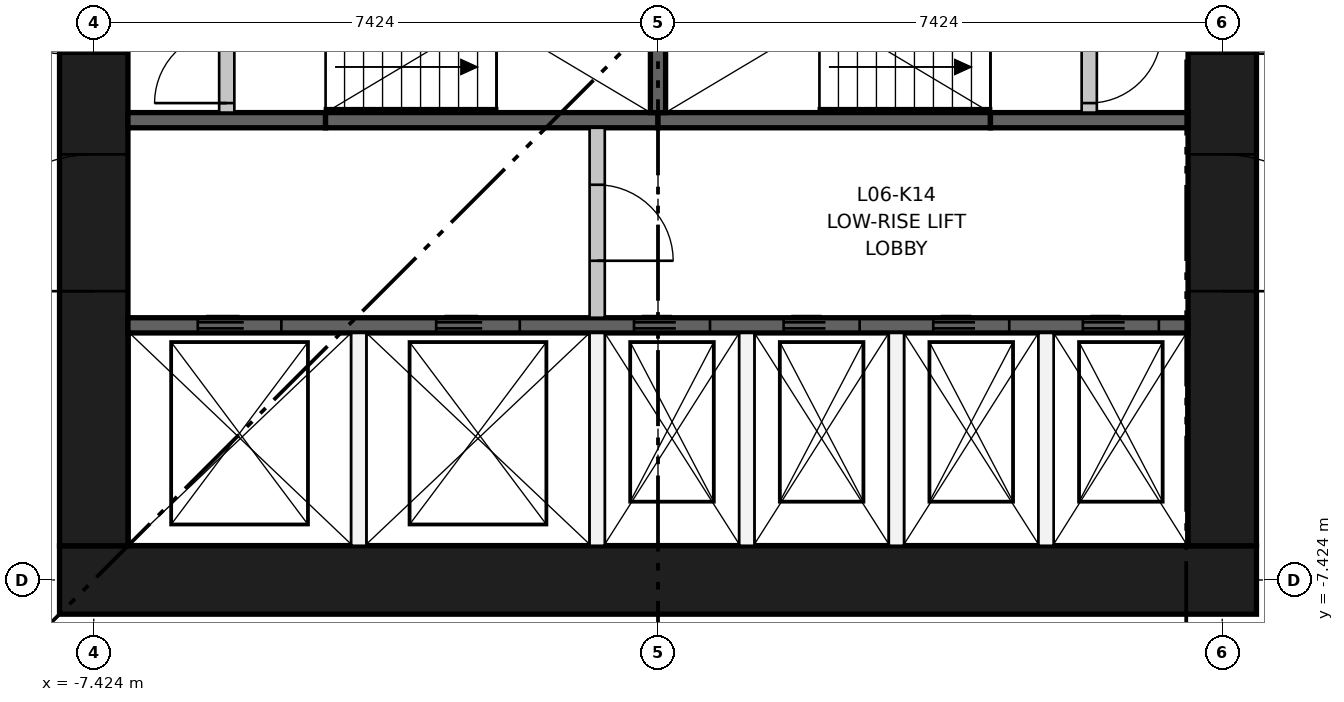
"""IFC4 building model, lengths in metres.
Left out: names, types, materials, properties, quantities, classifications, styles, units other than length and angle.
Written with IfcOpenShell. Run it as: python <this file> out.ifc"""

import sys

from ifc_helpers import new_model, si_unit, direction, frame, frame_2d, origin, place, context, subcontext, project, spatial, rectangle, extrude, element, fill, save


model = new_model("IFC4")
c1 = context("Model", 3, precision=1e-05, world=origin(), true_north=direction((0.0, 1.0)))
c2 = subcontext(c1, "Body", "Model", "MODEL_VIEW")
j1 = project(units=[si_unit("LENGTHUNIT", "METRE"), si_unit("PLANEANGLEUNIT", "RADIAN")], contexts=[c1])
p1 = place(None, origin())
s1 = spatial("IfcSite", under=j1, at=p1, CompositionType="ELEMENT")
p2 = place(p1, origin())
s2 = spatial("IfcBuilding", under=s1, at=p2, CompositionType="ELEMENT")
p3 = place(p2, frame((0.0, 0.0, 26.2)))
s3 = spatial("IfcBuildingStorey", under=s2, at=p3, CompositionType="ELEMENT", Elevation=26.2)
p4 = place(p3, frame((-7.874, -7.424, 0.0), z_axis=(0.0, 0.0, 1.0), x_axis=(1.0, 0.0, 0.0)))
e1 = element("IfcWall", 1, at=p4, inside=s3, PredefinedType="SHEAR", context=c2, shape_type="SweptSolid", body=[
    extrude(rectangle(XDim=15.748, YDim=0.9, at=frame_2d((7.874, 0.0))), origin(), (0.0, 0.0, 1.0), 3.65),
])
p5 = place(p3, frame((-7.424, -6.974, 0.0), z_axis=(0.0, 0.0, 1.0), x_axis=(0.0, 1.0, 0.0)))
e2 = element("IfcWall", 2, at=p5, inside=s3, PredefinedType="SHEAR", context=c2, shape_type="SweptSolid", body=[
    extrude(rectangle(XDim=13.948, YDim=0.9, at=frame_2d((6.974, 0.0))), origin(), (0.0, 0.0, 1.0), 3.65),
])
p6 = place(p5, frame((6.474, 0.0, 0.0)))
e3 = element("IfcOpeningElement", 3, at=p6, cuts=e2, PredefinedType="OPENING", context=c2, shape_type="SweptSolid", body=[
    extrude(rectangle(XDim=1.0, YDim=2.1, at=frame_2d((0.5, 1.05))), frame((0.0, 0.46, 0.0), z_axis=(0.0, -1.0, 0.0), x_axis=(1.0, 0.0, 0.0)), (0.0, 0.0, 1.0), 0.92),
])
p7 = place(p5, frame((3.35, 0.0, 0.0)))
e4 = element("IfcOpeningElement", 4, at=p7, cuts=e2, PredefinedType="OPENING", context=c2, shape_type="SweptSolid", body=[
    extrude(rectangle(XDim=1.8, YDim=2.1, at=frame_2d((0.9, 1.05))), frame((0.0, 0.46, 0.0), z_axis=(0.0, -1.0, 0.0), x_axis=(1.0, 0.0, 0.0)), (0.0, 0.0, 1.0), 0.92),
])
p8 = place(p5, frame((8.799, 0.0, 0.0)))
e5 = element("IfcOpeningElement", 5, at=p8, cuts=e2, PredefinedType="OPENING", context=c2, shape_type="SweptSolid", body=[
    extrude(rectangle(XDim=1.8, YDim=2.1, at=frame_2d((0.9, 1.05))), frame((0.0, 0.46, 0.0), z_axis=(0.0, -1.0, 0.0), x_axis=(1.0, 0.0, 0.0)), (0.0, 0.0, 1.0), 0.92),
])
p9 = place(p5, frame((11.974, 0.0, 0.0)))
e6 = element("IfcOpeningElement", 6, at=p9, cuts=e2, PredefinedType="OPENING", context=c2, shape_type="SweptSolid", body=[
    extrude(rectangle(XDim=1.0, YDim=2.1, at=frame_2d((0.5, 1.05))), frame((0.0, 0.46, 0.0), z_axis=(0.0, -1.0, 0.0), x_axis=(1.0, 0.0, 0.0)), (0.0, 0.0, 1.0), 0.92),
])
p10 = place(p3, frame((7.424, -6.974, 0.0), z_axis=(0.0, 0.0, 1.0), x_axis=(0.0, 1.0, 0.0)))
e7 = element("IfcWall", 7, at=p10, inside=s3, PredefinedType="SHEAR", context=c2, shape_type="SweptSolid", body=[
    extrude(rectangle(XDim=13.948, YDim=0.9, at=frame_2d((6.974, 0.0))), origin(), (0.0, 0.0, 1.0), 3.65),
])
p11 = place(p10, frame((6.474, 0.0, 0.0)))
e8 = element("IfcOpeningElement", 8, at=p11, cuts=e7, PredefinedType="OPENING", context=c2, shape_type="SweptSolid", body=[
    extrude(rectangle(XDim=1.0, YDim=2.1, at=frame_2d((0.5, 1.05))), frame((0.0, 0.46, 0.0), z_axis=(0.0, -1.0, 0.0), x_axis=(1.0, 0.0, 0.0)), (0.0, 0.0, 1.0), 0.92),
])
p12 = place(p10, frame((3.35, 0.0, 0.0)))
e9 = element("IfcOpeningElement", 9, at=p12, cuts=e7, PredefinedType="OPENING", context=c2, shape_type="SweptSolid", body=[
    extrude(rectangle(XDim=1.8, YDim=2.1, at=frame_2d((0.9, 1.05))), frame((0.0, 0.46, 0.0), z_axis=(0.0, -1.0, 0.0), x_axis=(1.0, 0.0, 0.0)), (0.0, 0.0, 1.0), 0.92),
])
p13 = place(p10, frame((8.799, 0.0, 0.0)))
e10 = element("IfcOpeningElement", 10, at=p13, cuts=e7, PredefinedType="OPENING", context=c2, shape_type="SweptSolid", body=[
    extrude(rectangle(XDim=1.8, YDim=2.1, at=frame_2d((0.9, 1.05))), frame((0.0, 0.46, 0.0), z_axis=(0.0, -1.0, 0.0), x_axis=(1.0, 0.0, 0.0)), (0.0, 0.0, 1.0), 0.92),
])
p14 = place(p3, frame((-6.974, -4.074, 0.0), z_axis=(0.0, 0.0, 1.0), x_axis=(1.0, 0.0, 0.0)))
e11 = element("IfcWall", 11, at=p14, inside=s3, PredefinedType="SHEAR", context=c2, shape_type="SweptSolid", body=[
    extrude(rectangle(XDim=13.948, YDim=0.2, at=frame_2d((6.974, 0.0))), origin(), (0.0, 0.0, 1.0), 3.3),
])
p15 = place(p14, frame((0.918, 0.0, 0.0)))
e12 = element("IfcOpeningElement", 12, at=p15, cuts=e11, PredefinedType="OPENING", context=c2, shape_type="SweptSolid", body=[
    extrude(rectangle(XDim=1.1, YDim=2.1, at=frame_2d((0.55, 1.05))), frame((0.0, 0.11, 0.0), z_axis=(0.0, -1.0, 0.0), x_axis=(1.0, 0.0, 0.0)), (0.0, 0.0, 1.0), 0.22),
])
p16 = place(p14, frame((4.055, 0.0, 0.0)))
e13 = element("IfcOpeningElement", 13, at=p16, cuts=e11, PredefinedType="OPENING", context=c2, shape_type="SweptSolid", body=[
    extrude(rectangle(XDim=1.1, YDim=2.1, at=frame_2d((0.55, 1.05))), frame((0.0, 0.11, 0.0), z_axis=(0.0, -1.0, 0.0), x_axis=(1.0, 0.0, 0.0)), (0.0, 0.0, 1.0), 0.22),
])
p17 = place(p14, frame((6.658, 0.0, 0.0)))
e14 = element("IfcOpeningElement", 14, at=p17, cuts=e11, PredefinedType="OPENING", context=c2, shape_type="SweptSolid", body=[
    extrude(rectangle(XDim=1.0, YDim=2.1, at=frame_2d((0.5, 1.05))), frame((0.0, 0.11, 0.0), z_axis=(0.0, -1.0, 0.0), x_axis=(1.0, 0.0, 0.0)), (0.0, 0.0, 1.0), 0.22),
])
p18 = place(p14, frame((8.627, 0.0, 0.0)))
e15 = element("IfcOpeningElement", 15, at=p18, cuts=e11, PredefinedType="OPENING", context=c2, shape_type="SweptSolid", body=[
    extrude(rectangle(XDim=1.0, YDim=2.1, at=frame_2d((0.5, 1.05))), frame((0.0, 0.11, 0.0), z_axis=(0.0, -1.0, 0.0), x_axis=(1.0, 0.0, 0.0)), (0.0, 0.0, 1.0), 0.22),
])
p19 = place(p14, frame((10.595, 0.0, 0.0)))
e16 = element("IfcOpeningElement", 16, at=p19, cuts=e11, PredefinedType="OPENING", context=c2, shape_type="SweptSolid", body=[
    extrude(rectangle(XDim=1.0, YDim=2.1, at=frame_2d((0.5, 1.05))), frame((0.0, 0.11, 0.0), z_axis=(0.0, -1.0, 0.0), x_axis=(1.0, 0.0, 0.0)), (0.0, 0.0, 1.0), 0.22),
])
p20 = place(p14, frame((12.564, 0.0, 0.0)))
e17 = element("IfcOpeningElement", 17, at=p20, cuts=e11, PredefinedType="OPENING", context=c2, shape_type="SweptSolid", body=[
    extrude(rectangle(XDim=1.0, YDim=2.1, at=frame_2d((0.5, 1.05))), frame((0.0, 0.11, 0.0), z_axis=(0.0, -1.0, 0.0), x_axis=(1.0, 0.0, 0.0)), (0.0, 0.0, 1.0), 0.22),
])
p21 = place(p3, frame((-6.974, -1.375, 0.0), z_axis=(0.0, 0.0, 1.0), x_axis=(1.0, 0.0, 0.0)))
e18 = element("IfcWall", 18, at=p21, inside=s3, PredefinedType="SHEAR", context=c2, shape_type="SweptSolid", body=[
    extrude(rectangle(XDim=2.6, YDim=0.2, at=frame_2d((1.3, 0.0))), origin(), (0.0, 0.0, 1.0), 3.3),
])
for number, where, z_axis, x_axis in (
    (19, (-4.374, -1.375, 0.0), (0.0, 0.0, 1.0), (1.0, 0.0, 0.0)),
    (20, (0.0, -1.375, 0.0), (0.0, 0.0, 1.0), (1.0, 0.0, 0.0)),
):
    element("IfcWall", number, at=place(p3, frame(where, z_axis=z_axis, x_axis=x_axis)), inside=s3, PredefinedType="SHEAR", context=c2, shape_type="SweptSolid", body=[
        extrude(rectangle(XDim=4.374, YDim=0.2, at=frame_2d((2.187, 0.0))), origin(), (0.0, 0.0, 1.0), 3.3),
    ])
p22 = place(p3, frame((4.374, -1.375, 0.0), z_axis=(0.0, 0.0, 1.0), x_axis=(1.0, 0.0, 0.0)))
e21 = element("IfcWall", 21, at=p22, inside=s3, PredefinedType="SHEAR", context=c2, shape_type="SweptSolid", body=[
    extrude(rectangle(XDim=2.6, YDim=0.2, at=frame_2d((1.3, 0.0))), origin(), (0.0, 0.0, 1.0), 3.3),
])
p23 = place(p3, frame((0.0, -1.275, 0.0), z_axis=(0.0, 0.0, 1.0), x_axis=(0.0, 1.0, 0.0)))
e22 = element("IfcWall", 22, at=p23, inside=s3, PredefinedType="SHEAR", context=c2, shape_type="SweptSolid", body=[
    extrude(rectangle(XDim=2.55, YDim=0.2, at=frame_2d((1.275, 0.0))), origin(), (0.0, 0.0, 1.0), 3.3),
])
for number, where, z_axis, x_axis in (
    (23, (-3.937, -6.974, 0.0), (0.0, 0.0, 1.0), (0.0, 1.0, 0.0)),
    (24, (-0.8, -6.974, 0.0), (0.0, 0.0, 1.0), (0.0, 1.0, 0.0)),
):
    element("IfcWall", number, at=place(p3, frame(where, z_axis=z_axis, x_axis=x_axis)), inside=s3, PredefinedType="PARTITIONING", context=c2, shape_type="SweptSolid", body=[
        extrude(rectangle(XDim=2.8, YDim=0.2, at=frame_2d((1.4, 0.0))), origin(), (0.0, 0.0, 1.0), 3.3),
    ])
p24 = place(p3, frame((-0.8, -3.974, 0.0), z_axis=(0.0, 0.0, 1.0), x_axis=(0.0, 1.0, 0.0)))
e25 = element("IfcWall", 25, at=p24, inside=s3, PredefinedType="PARTITIONING", context=c2, shape_type="SweptSolid", body=[
    extrude(rectangle(XDim=2.499, YDim=0.2, at=frame_2d((1.25, 0.0))), origin(), (0.0, 0.0, 1.0), 3.3),
])
p25 = place(p24, frame((0.75, 0.0, 0.0)))
e26 = element("IfcOpeningElement", 26, at=p25, cuts=e25, PredefinedType="OPENING", context=c2, shape_type="SweptSolid", body=[
    extrude(rectangle(XDim=1.0, YDim=2.1, at=frame_2d((0.5, 1.05))), frame((0.0, 0.11, 0.0), z_axis=(0.0, -1.0, 0.0), x_axis=(1.0, 0.0, 0.0)), (0.0, 0.0, 1.0), 0.22),
])
for number, where, z_axis, x_axis in (
    (27, (1.168, -6.974, 0.0), (0.0, 0.0, 1.0), (0.0, 1.0, 0.0)),
    (28, (3.137, -6.974, 0.0), (0.0, 0.0, 1.0), (0.0, 1.0, 0.0)),
    (29, (5.105, -6.974, 0.0), (0.0, 0.0, 1.0), (0.0, 1.0, 0.0)),
):
    element("IfcWall", number, at=place(p3, frame(where, z_axis=z_axis, x_axis=x_axis)), inside=s3, PredefinedType="PARTITIONING", context=c2, shape_type="SweptSolid", body=[
        extrude(rectangle(XDim=2.8, YDim=0.2, at=frame_2d((1.4, 0.0))), origin(), (0.0, 0.0, 1.0), 3.3),
    ])
p26 = place(p3, frame((-5.674, -1.275, 0.0), z_axis=(0.0, 0.0, 1.0), x_axis=(0.0, 1.0, 0.0)))
e30 = element("IfcWall", 30, at=p26, inside=s3, PredefinedType="PARTITIONING", context=c2, shape_type="SweptSolid", body=[
    extrude(rectangle(XDim=2.55, YDim=0.2, at=frame_2d((1.275, 0.0))), origin(), (0.0, 0.0, 1.0), 3.3),
])
p27 = place(p26, frame((0.125, 0.0, 0.0)))
e31 = element("IfcOpeningElement", 31, at=p27, cuts=e30, PredefinedType="OPENING", context=c2, shape_type="SweptSolid", body=[
    extrude(rectangle(XDim=0.95, YDim=2.1, at=frame_2d((0.475, 1.05))), frame((0.0, 0.11, 0.0), z_axis=(0.0, -1.0, 0.0), x_axis=(1.0, 0.0, 0.0)), (0.0, 0.0, 1.0), 0.22),
])
p28 = place(p26, frame((1.475, 0.0, 0.0)))
e32 = element("IfcOpeningElement", 32, at=p28, cuts=e30, PredefinedType="OPENING", context=c2, shape_type="SweptSolid", body=[
    extrude(rectangle(XDim=0.95, YDim=2.1, at=frame_2d((0.475, 1.05))), frame((0.0, 0.11, 0.0), z_axis=(0.0, -1.0, 0.0), x_axis=(1.0, 0.0, 0.0)), (0.0, 0.0, 1.0), 0.22),
])
p29 = place(p3, frame((5.674, -1.275, 0.0), z_axis=(0.0, 0.0, 1.0), x_axis=(0.0, 1.0, 0.0)))
e33 = element("IfcWall", 33, at=p29, inside=s3, PredefinedType="PARTITIONING", context=c2, shape_type="SweptSolid", body=[
    extrude(rectangle(XDim=2.55, YDim=0.2, at=frame_2d((1.275, 0.0))), origin(), (0.0, 0.0, 1.0), 3.3),
])
p30 = place(p29, frame((0.125, 0.0, 0.0)))
e34 = element("IfcOpeningElement", 34, at=p30, cuts=e33, PredefinedType="OPENING", context=c2, shape_type="SweptSolid", body=[
    extrude(rectangle(XDim=0.95, YDim=2.1, at=frame_2d((0.475, 1.05))), frame((0.0, 0.11, 0.0), z_axis=(0.0, -1.0, 0.0), x_axis=(1.0, 0.0, 0.0)), (0.0, 0.0, 1.0), 0.22),
])
p31 = place(p29, frame((1.475, 0.0, 0.0)))
e35 = element("IfcOpeningElement", 35, at=p31, cuts=e33, PredefinedType="OPENING", context=c2, shape_type="SweptSolid", body=[
    extrude(rectangle(XDim=0.95, YDim=2.1, at=frame_2d((0.475, 1.05))), frame((0.0, 0.11, 0.0), z_axis=(0.0, -1.0, 0.0), x_axis=(1.0, 0.0, 0.0)), (0.0, 0.0, 1.0), 0.22),
])
p32 = place(p15, origin())
e36 = element("IfcDoor", 36, at=p32, inside=s3, OperationType="DOUBLE_DOOR_SLIDING", PredefinedType="DOOR", context=c2, shape_type="SweptSolid", body=[
    extrude(rectangle(XDim=1.1, YDim=2.1, at=frame_2d((0.55, 1.05))), frame((0.0, 0.025, 0.0), z_axis=(0.0, -1.0, 0.0), x_axis=(1.0, 0.0, 0.0)), (0.0, 0.0, 1.0), 0.05),
])
fill(e12, e36)
p33 = place(p16, origin())
e37 = element("IfcDoor", 37, at=p33, inside=s3, OperationType="DOUBLE_DOOR_SLIDING", PredefinedType="DOOR", context=c2, shape_type="SweptSolid", body=[
    extrude(rectangle(XDim=1.1, YDim=2.1, at=frame_2d((0.55, 1.05))), frame((0.0, 0.025, 0.0), z_axis=(0.0, -1.0, 0.0), x_axis=(1.0, 0.0, 0.0)), (0.0, 0.0, 1.0), 0.05),
])
fill(e13, e37)
p34 = place(p17, origin())
e38 = element("IfcDoor", 38, at=p34, inside=s3, OperationType="DOUBLE_DOOR_SLIDING", PredefinedType="DOOR", context=c2, shape_type="SweptSolid", body=[
    extrude(rectangle(XDim=1.0, YDim=2.1, at=frame_2d((0.5, 1.05))), frame((0.0, 0.025, 0.0), z_axis=(0.0, -1.0, 0.0), x_axis=(1.0, 0.0, 0.0)), (0.0, 0.0, 1.0), 0.05),
])
fill(e14, e38)
p35 = place(p18, origin())
e39 = element("IfcDoor", 39, at=p35, inside=s3, OperationType="DOUBLE_DOOR_SLIDING", PredefinedType="DOOR", context=c2, shape_type="SweptSolid", body=[
    extrude(rectangle(XDim=1.0, YDim=2.1, at=frame_2d((0.5, 1.05))), frame((0.0, 0.025, 0.0), z_axis=(0.0, -1.0, 0.0), x_axis=(1.0, 0.0, 0.0)), (0.0, 0.0, 1.0), 0.05),
])
fill(e15, e39)
p36 = place(p19, origin())
e40 = element("IfcDoor", 40, at=p36, inside=s3, OperationType="DOUBLE_DOOR_SLIDING", PredefinedType="DOOR", context=c2, shape_type="SweptSolid", body=[
    extrude(rectangle(XDim=1.0, YDim=2.1, at=frame_2d((0.5, 1.05))), frame((0.0, 0.025, 0.0), z_axis=(0.0, -1.0, 0.0), x_axis=(1.0, 0.0, 0.0)), (0.0, 0.0, 1.0), 0.05),
])
fill(e16, e40)
p37 = place(p20, origin())
e41 = element("IfcDoor", 41, at=p37, inside=s3, OperationType="DOUBLE_DOOR_SLIDING", PredefinedType="DOOR", context=c2, shape_type="SweptSolid", body=[
    extrude(rectangle(XDim=1.0, YDim=2.1, at=frame_2d((0.5, 1.05))), frame((0.0, 0.025, 0.0), z_axis=(0.0, -1.0, 0.0), x_axis=(1.0, 0.0, 0.0)), (0.0, 0.0, 1.0), 0.05),
])
fill(e17, e41)
p38 = place(p27, origin())
e42 = element("IfcDoor", 42, at=p38, inside=s3, OperationType="SINGLE_SWING_LEFT", PredefinedType="DOOR", context=c2, shape_type="SweptSolid", body=[
    extrude(rectangle(XDim=0.95, YDim=2.1, at=frame_2d((0.475, 1.05))), frame((0.0, 0.025, 0.0), z_axis=(0.0, -1.0, 0.0), x_axis=(1.0, 0.0, 0.0)), (0.0, 0.0, 1.0), 0.05),
])
fill(e31, e42)
p39 = place(p30, frame((0.95, 0.0, 0.0), z_axis=(0.0, 0.0, 1.0), x_axis=(-1.0, 0.0, 0.0)))
e43 = element("IfcDoor", 43, at=p39, inside=s3, OperationType="SINGLE_SWING_RIGHT", PredefinedType="DOOR", context=c2, shape_type="SweptSolid", body=[
    extrude(rectangle(XDim=0.95, YDim=2.1, at=frame_2d((0.475, 1.05))), frame((0.0, 0.025, 0.0), z_axis=(0.0, -1.0, 0.0), x_axis=(1.0, 0.0, 0.0)), (0.0, 0.0, 1.0), 0.05),
])
fill(e34, e43)
p40 = place(p25, frame((1.0, 0.0, 0.0), z_axis=(0.0, 0.0, 1.0), x_axis=(-1.0, 0.0, 0.0)))
e44 = element("IfcDoor", 44, at=p40, inside=s3, OperationType="SINGLE_SWING_LEFT", PredefinedType="DOOR", context=c2, shape_type="SweptSolid", body=[
    extrude(rectangle(XDim=1.0, YDim=2.1, at=frame_2d((0.5, 1.05))), frame((0.0, 0.025, 0.0), z_axis=(0.0, -1.0, 0.0), x_axis=(1.0, 0.0, 0.0)), (0.0, 0.0, 1.0), 0.05),
])
fill(e26, e44)
p41 = place(p6, origin())
e45 = element("IfcDoor", 45, at=p41, inside=s3, OperationType="SINGLE_SWING_RIGHT", PredefinedType="DOOR", context=c2, shape_type="SweptSolid", body=[
    extrude(rectangle(XDim=1.0, YDim=2.1, at=frame_2d((0.5, 1.05))), frame((0.0, 0.45, 0.0), z_axis=(0.0, -1.0, 0.0), x_axis=(1.0, 0.0, 0.0)), (0.0, 0.0, 1.0), 0.05),
])
fill(e3, e45)
p42 = place(p7, origin())
e46 = element("IfcDoor", 46, at=p42, inside=s3, OperationType="DOUBLE_DOOR_SINGLE_SWING", PredefinedType="DOOR", context=c2, shape_type="SweptSolid", body=[
    extrude(rectangle(XDim=1.8, YDim=2.1, at=frame_2d((0.9, 1.05))), frame((0.0, 0.025, 0.0), z_axis=(0.0, -1.0, 0.0), x_axis=(1.0, 0.0, 0.0)), (0.0, 0.0, 1.0), 0.05),
])
fill(e4, e46)
p43 = place(p11, frame((1.0, 0.0, 0.0), z_axis=(0.0, 0.0, 1.0), x_axis=(-1.0, 0.0, 0.0)))
e47 = element("IfcDoor", 47, at=p43, inside=s3, OperationType="SINGLE_SWING_LEFT", PredefinedType="DOOR", context=c2, shape_type="SweptSolid", body=[
    extrude(rectangle(XDim=1.0, YDim=2.1, at=frame_2d((0.5, 1.05))), frame((0.0, 0.45, 0.0), z_axis=(0.0, -1.0, 0.0), x_axis=(1.0, 0.0, 0.0)), (0.0, 0.0, 1.0), 0.05),
])
fill(e8, e47)
p44 = place(p12, frame((1.8, 0.0, 0.0), z_axis=(0.0, 0.0, 1.0), x_axis=(-1.0, 0.0, 0.0)))
e48 = element("IfcDoor", 48, at=p44, inside=s3, OperationType="DOUBLE_DOOR_SINGLE_SWING", PredefinedType="DOOR", context=c2, shape_type="SweptSolid", body=[
    extrude(rectangle(XDim=1.8, YDim=2.1, at=frame_2d((0.9, 1.05))), frame((0.0, 0.025, 0.0), z_axis=(0.0, -1.0, 0.0), x_axis=(1.0, 0.0, 0.0)), (0.0, 0.0, 1.0), 0.05),
])
fill(e9, e48)
save(model, sys.argv[1])
